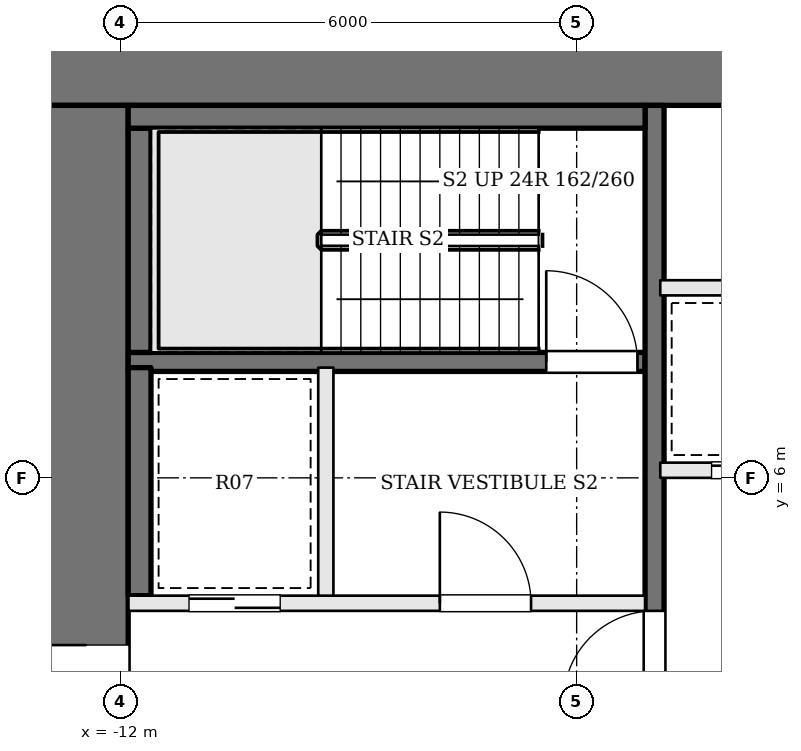
"""IFC4 building model, lengths in metres.
Left out: names, types, materials, properties, quantities, classifications, styles, units other than length and angle.
Written with IfcOpenShell. Run it as: python <this file> out.ifc"""

import sys

from ifc_helpers import new_model, si_unit, direction, frame, frame_2d, origin, place, context, subcontext, project, spatial, rectangle, extrude, element, fill, save


model = new_model("IFC4")
c1 = context("Model", 3, precision=1e-05, world=origin(), true_north=direction((0.0, 1.0)))
c2 = subcontext(c1, "Body", "Model", "MODEL_VIEW")
j1 = project(units=[si_unit("LENGTHUNIT", "METRE"), si_unit("PLANEANGLEUNIT", "RADIAN")], contexts=[c1])
p1 = place(None, origin())
s1 = spatial("IfcSite", under=j1, at=p1, CompositionType="ELEMENT")
p2 = place(p1, origin())
s2 = spatial("IfcBuilding", under=s1, at=p2, CompositionType="ELEMENT")
p3 = place(p2, frame((0.0, 0.0, 157.8)))
s3 = spatial("IfcBuildingStorey", under=s2, at=p3, CompositionType="ELEMENT", Elevation=157.8)
p4 = place(p3, frame((-13.0, 11.45, 0.0), z_axis=(0.0, 0.0, 1.0), x_axis=(1.0, 0.0, 0.0)))
e1 = element("IfcWall", 1, at=p4, inside=s3, PredefinedType="SHEAR", context=c2, shape_type="SweptSolid", body=[
    extrude(rectangle(XDim=26.0, YDim=1.1, at=frame_2d((13.0, 0.0))), origin(), (0.0, 0.0, 1.0), 3.9),
])
p5 = place(p4, frame((9.65, 0.0, 0.0)))
e2 = element("IfcOpeningElement", 2, at=p5, cuts=e1, PredefinedType="OPENING", context=c2, shape_type="SweptSolid", body=[
    extrude(rectangle(XDim=1.0, YDim=2.1, at=frame_2d((0.5, 1.05))), frame((0.0, 0.56, 0.0), z_axis=(0.0, -1.0, 0.0), x_axis=(1.0, 0.0, 0.0)), (0.0, 0.0, 1.0), 1.12),
])
p6 = place(p4, frame((12.675, 0.0, 0.0)))
e3 = element("IfcOpeningElement", 3, at=p6, cuts=e1, PredefinedType="OPENING", context=c2, shape_type="SweptSolid", body=[
    extrude(rectangle(XDim=0.7, YDim=2.1, at=frame_2d((0.35, 1.05))), frame((0.0, 0.56, 0.0), z_axis=(0.0, -1.0, 0.0), x_axis=(1.0, 0.0, 0.0)), (0.0, 0.0, 1.0), 1.12),
])
p7 = place(p4, frame((14.725, 0.0, 0.0)))
e4 = element("IfcOpeningElement", 4, at=p7, cuts=e1, PredefinedType="OPENING", context=c2, shape_type="SweptSolid", body=[
    extrude(rectangle(XDim=0.7, YDim=2.1, at=frame_2d((0.35, 1.05))), frame((0.0, 0.56, 0.0), z_axis=(0.0, -1.0, 0.0), x_axis=(1.0, 0.0, 0.0)), (0.0, 0.0, 1.0), 1.12),
])
p8 = place(p4, frame((16.6, 0.0, 0.0)))
e5 = element("IfcOpeningElement", 5, at=p8, cuts=e1, PredefinedType="OPENING", context=c2, shape_type="SweptSolid", body=[
    extrude(rectangle(XDim=1.0, YDim=2.1, at=frame_2d((0.5, 1.05))), frame((0.0, 0.56, 0.0), z_axis=(0.0, -1.0, 0.0), x_axis=(1.0, 0.0, 0.0)), (0.0, 0.0, 1.0), 1.12),
])
p9 = place(p3, frame((-12.45, -1.9, 0.0), z_axis=(0.0, 0.0, 1.0), x_axis=(0.0, 1.0, 0.0)))
e6 = element("IfcWall", 6, at=p9, inside=s3, PredefinedType="SHEAR", context=c2, shape_type="SweptSolid", body=[
    extrude(rectangle(XDim=12.8, YDim=1.1, at=frame_2d((6.4, 0.0))), origin(), (0.0, 0.0, 1.0), 3.9),
])
p10 = place(p9, frame((3.9, 0.0, 0.0)))
e7 = element("IfcOpeningElement", 7, at=p10, cuts=e6, PredefinedType="OPENING", context=c2, shape_type="SweptSolid", body=[
    extrude(rectangle(XDim=1.8, YDim=2.1, at=frame_2d((0.9, 1.05))), frame((0.0, 0.56, 0.0), z_axis=(0.0, -1.0, 0.0), x_axis=(1.0, 0.0, 0.0)), (0.0, 0.0, 1.0), 1.12),
])
p11 = place(p3, frame((-11.9, 4.35, 0.0), z_axis=(0.0, 0.0, 1.0), x_axis=(1.0, 0.0, 0.0)))
e8 = element("IfcWall", 8, at=p11, inside=s3, PredefinedType="SOLIDWALL", context=c2, shape_type="SweptSolid", body=[
    extrude(rectangle(XDim=6.8, YDim=0.2, at=frame_2d((3.4, 0.0))), origin(), (0.0, 0.0, 1.0), 3.7),
])
p12 = place(p11, frame((4.1, 0.0, 0.0)))
e9 = element("IfcOpeningElement", 9, at=p12, cuts=e8, PredefinedType="OPENING", context=c2, shape_type="SweptSolid", body=[
    extrude(rectangle(XDim=1.2, YDim=2.1, at=frame_2d((0.6, 1.05))), frame((0.0, 0.11, 0.0), z_axis=(0.0, -1.0, 0.0), x_axis=(1.0, 0.0, 0.0)), (0.0, 0.0, 1.0), 0.22),
])
p13 = place(p11, frame((0.8, 0.0, 0.0)))
e10 = element("IfcOpeningElement", 10, at=p13, cuts=e8, PredefinedType="OPENING", context=c2, shape_type="SweptSolid", body=[
    extrude(rectangle(XDim=1.2, YDim=2.1, at=frame_2d((0.6, 1.05))), frame((0.0, 0.11, 0.0), z_axis=(0.0, -1.0, 0.0), x_axis=(1.0, 0.0, 0.0)), (0.0, 0.0, 1.0), 0.22),
])
p14 = place(p3, frame((-11.9, 7.525, 0.0), z_axis=(0.0, 0.0, 1.0), x_axis=(1.0, 0.0, 0.0)))
e11 = element("IfcWall", 11, at=p14, inside=s3, PredefinedType="SOLIDWALL", context=c2, shape_type="SweptSolid", body=[
    extrude(rectangle(XDim=6.8, YDim=0.25, at=frame_2d((3.4, 0.0))), origin(), (0.0, 0.0, 1.0), 3.7),
])
p15 = place(p14, frame((5.5, 0.0, 0.0)))
e12 = element("IfcOpeningElement", 12, at=p15, cuts=e11, PredefinedType="OPENING", context=c2, shape_type="SweptSolid", body=[
    extrude(rectangle(XDim=1.2, YDim=2.1, at=frame_2d((0.6, 1.05))), frame((0.0, 0.135, 0.0), z_axis=(0.0, -1.0, 0.0), x_axis=(1.0, 0.0, 0.0)), (0.0, 0.0, 1.0), 0.27),
])
p16 = place(p3, frame((-9.3, 4.45, 0.0), z_axis=(0.0, 0.0, 1.0), x_axis=(0.0, 1.0, 0.0)))
e13 = element("IfcWall", 13, at=p16, inside=s3, PredefinedType="SOLIDWALL", context=c2, shape_type="SweptSolid", body=[
    extrude(rectangle(XDim=3.0, YDim=0.2, at=frame_2d((1.5, 0.0))), origin(), (0.0, 0.0, 1.0), 3.7),
])
p17 = place(p3, frame((-4.975, -1.9, 0.0), z_axis=(0.0, 0.0, 1.0), x_axis=(0.0, 1.0, 0.0)))
e14 = element("IfcWall", 14, at=p17, inside=s3, PredefinedType="SOLIDWALL", context=c2, shape_type="SweptSolid", body=[
    extrude(rectangle(XDim=12.8, YDim=0.25, at=frame_2d((6.4, 0.0))), origin(), (0.0, 0.0, 1.0), 3.7),
])
p18 = place(p17, frame((4.95, 0.0, 0.0)))
e15 = element("IfcOpeningElement", 15, at=p18, cuts=e14, PredefinedType="OPENING", context=c2, shape_type="SweptSolid", body=[
    extrude(rectangle(XDim=1.2, YDim=2.1, at=frame_2d((0.6, 1.05))), frame((0.0, 0.135, 0.0), z_axis=(0.0, -1.0, 0.0), x_axis=(1.0, 0.0, 0.0)), (0.0, 0.0, 1.0), 0.27),
])
p19 = place(p3, frame((-11.75, 4.45, 0.0), z_axis=(0.0, 0.0, 1.0), x_axis=(0.0, 1.0, 0.0)))
e16 = element("IfcWall", 16, at=p19, inside=s3, PredefinedType="SOLIDWALL", context=c2, shape_type="SweptSolid", body=[
    extrude(rectangle(XDim=3.0, YDim=0.3, at=frame_2d((1.5, 0.0))), origin(), (0.0, 0.0, 1.0), 3.7),
])
p20 = place(p3, frame((-11.75, 7.65, 0.0), z_axis=(0.0, 0.0, 1.0), x_axis=(0.0, 1.0, 0.0)))
e17 = element("IfcWall", 17, at=p20, inside=s3, PredefinedType="SOLIDWALL", context=c2, shape_type="SweptSolid", body=[
    extrude(rectangle(XDim=2.95, YDim=0.3, at=frame_2d((1.475, 0.0))), origin(), (0.0, 0.0, 1.0), 3.7),
])
p21 = place(p3, frame((-11.9, 10.75, 0.0), z_axis=(0.0, 0.0, 1.0), x_axis=(1.0, 0.0, 0.0)))
e18 = element("IfcWall", 18, at=p21, inside=s3, PredefinedType="SOLIDWALL", context=c2, shape_type="SweptSolid", body=[
    extrude(rectangle(XDim=6.8, YDim=0.3, at=frame_2d((3.4, 0.0))), origin(), (0.0, 0.0, 1.0), 3.7),
])
p22 = place(p3, frame((-4.9, 6.1, 0.0), z_axis=(0.0, 0.0, 1.0), x_axis=(1.0, 0.0, 0.0)))
e19 = element("IfcWall", 19, at=p22, inside=s3, PredefinedType="SOLIDWALL", context=c2, shape_type="SweptSolid", body=[
    extrude(rectangle(XDim=9.8, YDim=0.2, at=frame_2d((4.9, 0.0))), origin(), (0.0, 0.0, 1.0), 3.7),
])
p23 = place(p22, frame((0.675, 0.0, 0.0)))
e20 = element("IfcOpeningElement", 20, at=p23, cuts=e19, PredefinedType="OPENING", context=c2, shape_type="SweptSolid", body=[
    extrude(rectangle(XDim=1.1, YDim=2.1, at=frame_2d((0.55, 1.05))), frame((0.0, 0.11, 0.0), z_axis=(0.0, -1.0, 0.0), x_axis=(1.0, 0.0, 0.0)), (0.0, 0.0, 1.0), 0.22),
])
p24 = place(p22, frame((3.125, 0.0, 0.0)))
e21 = element("IfcOpeningElement", 21, at=p24, cuts=e19, PredefinedType="OPENING", context=c2, shape_type="SweptSolid", body=[
    extrude(rectangle(XDim=1.1, YDim=2.1, at=frame_2d((0.55, 1.05))), frame((0.0, 0.11, 0.0), z_axis=(0.0, -1.0, 0.0), x_axis=(1.0, 0.0, 0.0)), (0.0, 0.0, 1.0), 0.22),
])
p25 = place(p22, frame((5.575, 0.0, 0.0)))
e22 = element("IfcOpeningElement", 22, at=p25, cuts=e19, PredefinedType="OPENING", context=c2, shape_type="SweptSolid", body=[
    extrude(rectangle(XDim=1.1, YDim=2.1, at=frame_2d((0.55, 1.05))), frame((0.0, 0.11, 0.0), z_axis=(0.0, -1.0, 0.0), x_axis=(1.0, 0.0, 0.0)), (0.0, 0.0, 1.0), 0.22),
])
p26 = place(p22, frame((8.025, 0.0, 0.0)))
e23 = element("IfcOpeningElement", 23, at=p26, cuts=e19, PredefinedType="OPENING", context=c2, shape_type="SweptSolid", body=[
    extrude(rectangle(XDim=1.1, YDim=2.1, at=frame_2d((0.55, 1.05))), frame((0.0, 0.11, 0.0), z_axis=(0.0, -1.0, 0.0), x_axis=(1.0, 0.0, 0.0)), (0.0, 0.0, 1.0), 0.22),
])
p27 = place(p3, frame((-4.9, 8.5, 0.0), z_axis=(0.0, 0.0, 1.0), x_axis=(1.0, 0.0, 0.0)))
e24 = element("IfcWall", 24, at=p27, inside=s3, PredefinedType="SOLIDWALL", context=c2, shape_type="SweptSolid", body=[
    extrude(rectangle(XDim=9.8, YDim=0.2, at=frame_2d((4.9, 0.0))), origin(), (0.0, 0.0, 1.0), 3.7),
])
p28 = place(p10, origin())
e25 = element("IfcDoor", 25, at=p28, inside=s3, OperationType="DOUBLE_DOOR_SINGLE_SWING", PredefinedType="DOOR", context=c2, shape_type="SweptSolid", body=[
    extrude(rectangle(XDim=1.8, YDim=2.1, at=frame_2d((0.9, 1.05))), frame((0.0, 0.025, 0.0), z_axis=(0.0, -1.0, 0.0), x_axis=(1.0, 0.0, 0.0)), (0.0, 0.0, 1.0), 0.05),
])
fill(e7, e25)
p29 = place(p18, origin())
e26 = element("IfcDoor", 26, at=p29, inside=s3, OperationType="SINGLE_SWING_LEFT", PredefinedType="DOOR", context=c2, shape_type="SweptSolid", body=[
    extrude(rectangle(XDim=1.2, YDim=2.1, at=frame_2d((0.6, 1.05))), frame((0.0, 0.025, 0.0), z_axis=(0.0, -1.0, 0.0), x_axis=(1.0, 0.0, 0.0)), (0.0, 0.0, 1.0), 0.05),
])
fill(e15, e26)
p30 = place(p12, origin())
e27 = element("IfcDoor", 27, at=p30, inside=s3, OperationType="SINGLE_SWING_LEFT", PredefinedType="DOOR", context=c2, shape_type="SweptSolid", body=[
    extrude(rectangle(XDim=1.2, YDim=2.1, at=frame_2d((0.6, 1.05))), frame((0.0, 0.025, 0.0), z_axis=(0.0, -1.0, 0.0), x_axis=(1.0, 0.0, 0.0)), (0.0, 0.0, 1.0), 0.05),
])
fill(e9, e27)
p31 = place(p15, origin())
e28 = element("IfcDoor", 28, at=p31, inside=s3, OperationType="SINGLE_SWING_LEFT", PredefinedType="DOOR", context=c2, shape_type="SweptSolid", body=[
    extrude(rectangle(XDim=1.2, YDim=2.1, at=frame_2d((0.6, 1.05))), frame((0.0, 0.025, 0.0), z_axis=(0.0, -1.0, 0.0), x_axis=(1.0, 0.0, 0.0)), (0.0, 0.0, 1.0), 0.05),
])
fill(e12, e28)
p32 = place(p13, origin())
e29 = element("IfcDoor", 29, at=p32, inside=s3, OperationType="SLIDING_TO_RIGHT", PredefinedType="DOOR", context=c2, shape_type="SweptSolid", body=[
    extrude(rectangle(XDim=1.2, YDim=2.1, at=frame_2d((0.6, 1.05))), frame((0.0, 0.025, 0.0), z_axis=(0.0, -1.0, 0.0), x_axis=(1.0, 0.0, 0.0)), (0.0, 0.0, 1.0), 0.05),
])
fill(e10, e29)
p33 = place(p23, origin())
e30 = element("IfcDoor", 30, at=p33, inside=s3, OperationType="SLIDING_TO_RIGHT", PredefinedType="DOOR", context=c2, shape_type="SweptSolid", body=[
    extrude(rectangle(XDim=1.1, YDim=2.1, at=frame_2d((0.55, 1.05))), frame((0.0, 0.025, 0.0), z_axis=(0.0, -1.0, 0.0), x_axis=(1.0, 0.0, 0.0)), (0.0, 0.0, 1.0), 0.05),
])
fill(e20, e30)
save(model, sys.argv[1])
